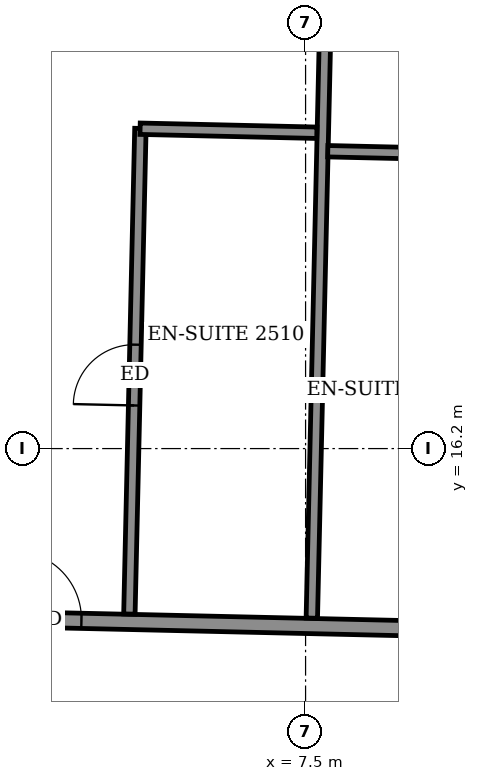
"""IFC4 building model, lengths in metres.
Left out: names, types, materials, properties, quantities, classifications, styles, units other than length and angle.
Written with IfcOpenShell. Run it as: python <this file> out.ifc"""

import sys

from ifc_helpers import new_model, si_unit, direction, frame, frame_2d, origin, place, context, subcontext, project, spatial, rectangle, extrude, element, fill, save


model = new_model("IFC4")
c1 = context("Model", 3, precision=1e-05, world=origin(), true_north=direction((0.0, 1.0)))
c2 = subcontext(c1, "Body", "Model", "MODEL_VIEW")
j1 = project(units=[si_unit("LENGTHUNIT", "METRE"), si_unit("PLANEANGLEUNIT", "RADIAN")], contexts=[c1])
p1 = place(None, origin())
s1 = spatial("IfcSite", under=j1, at=p1, CompositionType="ELEMENT")
p2 = place(p1, origin())
s2 = spatial("IfcBuilding", under=s1, at=p2, CompositionType="ELEMENT")
p3 = place(p2, frame((0.0, 0.0, 101.9)))
s3 = spatial("IfcBuildingStorey", under=s2, at=p3, CompositionType="ELEMENT", Elevation=101.9)
p4 = place(p3, frame((-26.316, 14.634, 0.0), z_axis=(0.0, 0.0, 1.0), x_axis=(0.999742734556, -0.02268181435, 0.0)))
e1 = element("IfcWall", 1, at=p4, inside=s3, PredefinedType="PARTITIONING", context=c2, shape_type="SweptSolid", body=[
    extrude(rectangle(XDim=50.708, YDim=0.2, at=frame_2d((25.354, 0.0))), origin(), (0.0, 0.0, 1.0), 3.05),
])
p5 = place(p4, frame((48.229, 0.0, 0.0)))
e2 = element("IfcOpeningElement", 2, at=p5, cuts=e1, PredefinedType="OPENING", context=c2, shape_type="SweptSolid", body=[
    extrude(rectangle(XDim=1.0, YDim=2.1, at=frame_2d((0.5, 1.05))), frame((0.0, 0.11, 0.0), z_axis=(0.0, -1.0, 0.0), x_axis=(1.0, 0.0, 0.0)), (0.0, 0.0, 1.0), 0.22),
])
p6 = place(p4, frame((43.6, 0.0, 0.0)))
e3 = element("IfcOpeningElement", 3, at=p6, cuts=e1, PredefinedType="OPENING", context=c2, shape_type="SweptSolid", body=[
    extrude(rectangle(XDim=0.9, YDim=2.1, at=frame_2d((0.45, 1.05))), frame((0.0, 0.11, 0.0), z_axis=(0.0, -1.0, 0.0), x_axis=(1.0, 0.0, 0.0)), (0.0, 0.0, 1.0), 0.22),
])
p7 = place(p4, frame((38.925, 0.0, 0.0)))
e4 = element("IfcOpeningElement", 4, at=p7, cuts=e1, PredefinedType="OPENING", context=c2, shape_type="SweptSolid", body=[
    extrude(rectangle(XDim=0.9, YDim=2.1, at=frame_2d((0.45, 1.05))), frame((0.0, 0.11, 0.0), z_axis=(0.0, -1.0, 0.0), x_axis=(1.0, 0.0, 0.0)), (0.0, 0.0, 1.0), 0.22),
])
p8 = place(p4, frame((36.9, 0.0, 0.0)))
e5 = element("IfcOpeningElement", 5, at=p8, cuts=e1, PredefinedType="OPENING", context=c2, shape_type="SweptSolid", body=[
    extrude(rectangle(XDim=0.9, YDim=2.1, at=frame_2d((0.45, 1.05))), frame((0.0, 0.11, 0.0), z_axis=(0.0, -1.0, 0.0), x_axis=(1.0, 0.0, 0.0)), (0.0, 0.0, 1.0), 0.22),
])
p9 = place(p4, frame((29.975, 0.0, 0.0)))
e6 = element("IfcOpeningElement", 6, at=p9, cuts=e1, PredefinedType="OPENING", context=c2, shape_type="SweptSolid", body=[
    extrude(rectangle(XDim=0.9, YDim=2.1, at=frame_2d((0.45, 1.05))), frame((0.0, 0.11, 0.0), z_axis=(0.0, -1.0, 0.0), x_axis=(1.0, 0.0, 0.0)), (0.0, 0.0, 1.0), 0.22),
])
p10 = place(p4, frame((27.9, 0.0, 0.0)))
e7 = element("IfcOpeningElement", 7, at=p10, cuts=e1, PredefinedType="OPENING", context=c2, shape_type="SweptSolid", body=[
    extrude(rectangle(XDim=0.9, YDim=2.1, at=frame_2d((0.45, 1.05))), frame((0.0, 0.11, 0.0), z_axis=(0.0, -1.0, 0.0), x_axis=(1.0, 0.0, 0.0)), (0.0, 0.0, 1.0), 0.22),
])
p11 = place(p4, frame((21.175, 0.0, 0.0)))
e8 = element("IfcOpeningElement", 8, at=p11, cuts=e1, PredefinedType="OPENING", context=c2, shape_type="SweptSolid", body=[
    extrude(rectangle(XDim=0.9, YDim=2.1, at=frame_2d((0.45, 1.05))), frame((0.0, 0.11, 0.0), z_axis=(0.0, -1.0, 0.0), x_axis=(1.0, 0.0, 0.0)), (0.0, 0.0, 1.0), 0.22),
])
p12 = place(p4, frame((19.25, 0.0, 0.0)))
e9 = element("IfcOpeningElement", 9, at=p12, cuts=e1, PredefinedType="OPENING", context=c2, shape_type="SweptSolid", body=[
    extrude(rectangle(XDim=0.9, YDim=2.1, at=frame_2d((0.45, 1.05))), frame((0.0, 0.11, 0.0), z_axis=(0.0, -1.0, 0.0), x_axis=(1.0, 0.0, 0.0)), (0.0, 0.0, 1.0), 0.22),
])
p13 = place(p4, frame((12.375, 0.0, 0.0)))
e10 = element("IfcOpeningElement", 10, at=p13, cuts=e1, PredefinedType="OPENING", context=c2, shape_type="SweptSolid", body=[
    extrude(rectangle(XDim=0.9, YDim=2.1, at=frame_2d((0.45, 1.05))), frame((0.0, 0.11, 0.0), z_axis=(0.0, -1.0, 0.0), x_axis=(1.0, 0.0, 0.0)), (0.0, 0.0, 1.0), 0.22),
])
p14 = place(p4, frame((10.225, 0.0, 0.0)))
e11 = element("IfcOpeningElement", 11, at=p14, cuts=e1, PredefinedType="OPENING", context=c2, shape_type="SweptSolid", body=[
    extrude(rectangle(XDim=0.9, YDim=2.1, at=frame_2d((0.45, 1.05))), frame((0.0, 0.11, 0.0), z_axis=(0.0, -1.0, 0.0), x_axis=(1.0, 0.0, 0.0)), (0.0, 0.0, 1.0), 0.22),
])
p15 = place(p4, frame((0.85, 0.0, 0.0)))
e12 = element("IfcOpeningElement", 12, at=p15, cuts=e1, PredefinedType="OPENING", context=c2, shape_type="SweptSolid", body=[
    extrude(rectangle(XDim=1.0, YDim=2.1, at=frame_2d((0.5, 1.05))), frame((0.0, 0.11, 0.0), z_axis=(0.0, -1.0, 0.0), x_axis=(1.0, 0.0, 0.0)), (0.0, 0.0, 1.0), 0.22),
])
p16 = place(p4, frame((5.55, 0.0, 0.0)))
e13 = element("IfcOpeningElement", 13, at=p16, cuts=e1, PredefinedType="OPENING", context=c2, shape_type="SweptSolid", body=[
    extrude(rectangle(XDim=0.9, YDim=2.1, at=frame_2d((0.45, 1.05))), frame((0.0, 0.11, 0.0), z_axis=(0.0, -1.0, 0.0), x_axis=(1.0, 0.0, 0.0)), (0.0, 0.0, 1.0), 0.22),
])
p17 = place(p3, frame((5.182, 14.023, 0.0), z_axis=(0.0, 0.0, 1.0), x_axis=(0.022691900969, 0.999742505664, 0.0)))
e14 = element("IfcWall", 14, at=p17, inside=s3, PredefinedType="PARTITIONING", context=c2, shape_type="SweptSolid", body=[
    extrude(rectangle(XDim=6.391, YDim=0.15, at=frame_2d((3.195, 0.0))), origin(), (0.0, 0.0, 1.0), 3.05),
])
p18 = place(p17, frame((2.745, 0.0, 0.0)))
e15 = element("IfcOpeningElement", 15, at=p18, cuts=e14, PredefinedType="OPENING", context=c2, shape_type="SweptSolid", body=[
    extrude(rectangle(XDim=0.8, YDim=2.1, at=frame_2d((0.4, 1.05))), frame((0.0, 0.085, 0.0), z_axis=(0.0, -1.0, 0.0), x_axis=(1.0, 0.0, 0.0)), (0.0, 0.0, 1.0), 0.17),
])
p19 = place(p3, frame((7.582, 13.969, 0.0), z_axis=(0.0, 0.0, 1.0), x_axis=(0.022686732602, 0.99974262296, 0.0)))
e16 = element("IfcWall", 16, at=p19, inside=s3, PredefinedType="PARTITIONING", context=c2, shape_type="SweptSolid", body=[
    extrude(rectangle(XDim=11.676, YDim=0.15, at=frame_2d((5.838, 0.0))), origin(), (0.0, 0.0, 1.0), 2.55),
])
for number, where, z_axis, x_axis in (
    (17, (7.792, 20.112, 0.0), (0.0, 0.0, 1.0), (1.0, -0.023, 0.0)),
    (18, (5.323, 20.408, 0.0), (0.0, 0.0, 1.0), (1.0, -0.023, 0.0)),
):
    element("IfcWall", number, at=place(p3, frame(where, z_axis=z_axis, x_axis=x_axis)), inside=s3, PredefinedType="PARTITIONING", context=c2, shape_type="SweptSolid", body=[
        extrude(rectangle(XDim=2.325, YDim=0.15, at=frame_2d((1.163, 0.0))), origin(), (0.0, 0.0, 1.0), 3.05),
    ])
p20 = place(p9, origin())
e19 = element("IfcDoor", 19, at=p20, inside=s3, OperationType="SINGLE_SWING_RIGHT", PredefinedType="DOOR", context=c2, shape_type="SweptSolid", body=[
    extrude(rectangle(XDim=0.9, YDim=2.1, at=frame_2d((0.45, 1.05))), frame((0.0, 0.025, 0.0), z_axis=(0.0, -1.0, 0.0), x_axis=(1.0, 0.0, 0.0)), (0.0, 0.0, 1.0), 0.05),
])
fill(e6, e19)
p21 = place(p18, origin())
e20 = element("IfcDoor", 20, at=p21, inside=s3, OperationType="SINGLE_SWING_RIGHT", PredefinedType="DOOR", context=c2, shape_type="SweptSolid", body=[
    extrude(rectangle(XDim=0.8, YDim=2.1, at=frame_2d((0.4, 1.05))), frame((0.0, 0.025, 0.0), z_axis=(0.0, -1.0, 0.0), x_axis=(1.0, 0.0, 0.0)), (0.0, 0.0, 1.0), 0.05),
])
fill(e15, e20)
save(model, sys.argv[1])
